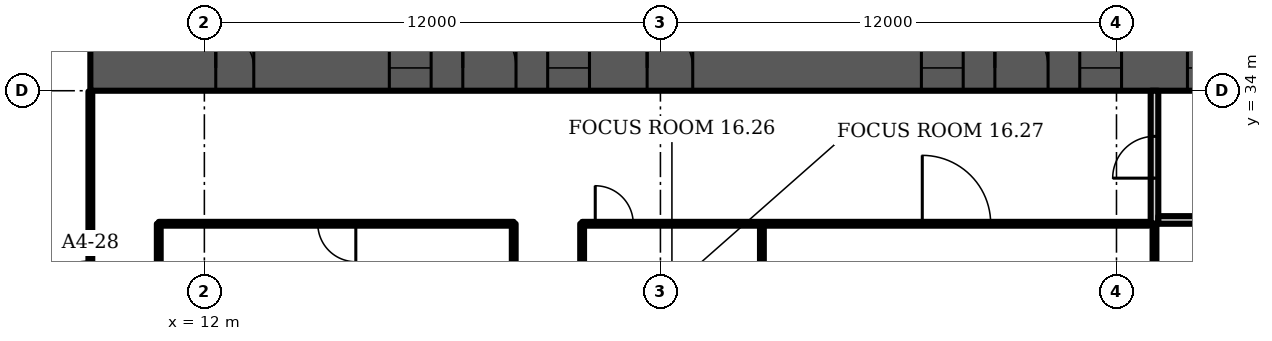
"""IFC4 building model, lengths in metres.
Left out: names, types, materials, properties, quantities, classifications, styles, units other than length and angle.
Written with IfcOpenShell. Run it as: python <this file> out.ifc"""

import sys

from ifc_helpers import new_model, si_unit, direction, frame, frame_2d, origin, place, context, subcontext, project, spatial, rectangle, extrude, element, fill, save


model = new_model("IFC4")
c1 = context("Model", 3, precision=1e-05, world=origin(), true_north=direction((0.0, 1.0)))
c2 = subcontext(c1, "Body", "Model", "MODEL_VIEW")
j1 = project(units=[si_unit("LENGTHUNIT", "METRE"), si_unit("PLANEANGLEUNIT", "RADIAN")], contexts=[c1])
p1 = place(None, origin())
s1 = spatial("IfcSite", under=j1, at=p1, CompositionType="ELEMENT")
p2 = place(p1, origin())
s2 = spatial("IfcBuilding", under=s1, at=p2, CompositionType="ELEMENT")
p3 = place(p2, frame((0.0, 0.0, 77.5)))
s3 = spatial("IfcBuildingStorey", under=s2, at=p3, CompositionType="ELEMENT", Elevation=77.5)
p4 = place(p3, frame((9.0, 34.6, 0.0), z_axis=(0.0, 0.0, 1.0), x_axis=(1.0, 0.0, 0.0)))
e1 = element("IfcWall", 1, at=p4, inside=s3, PredefinedType="SHEAR", context=c2, shape_type="SweptSolid", body=[
    extrude(rectangle(XDim=56.0, YDim=1.2, at=frame_2d((28.0, 0.0))), origin(), (0.0, 0.0, 1.0), 3.6),
])
p5 = place(p4, frame((3.3, 0.0, 0.0)))
e2 = element("IfcOpeningElement", 2, at=p5, cuts=e1, PredefinedType="OPENING", context=c2, shape_type="SweptSolid", body=[
    extrude(rectangle(XDim=1.0, YDim=2.1, at=frame_2d((0.5, 1.05))), frame((0.0, 0.61, 0.0), z_axis=(0.0, -1.0, 0.0), x_axis=(1.0, 0.0, 0.0)), (0.0, 0.0, 1.0), 1.22),
])
p6 = place(p4, frame((7.867, 0.0, 0.0)))
e3 = element("IfcOpeningElement", 3, at=p6, cuts=e1, PredefinedType="OPENING", context=c2, shape_type="SweptSolid", body=[
    extrude(rectangle(XDim=1.1, YDim=2.1, at=frame_2d((0.55, 1.05))), frame((0.0, 0.61, 0.0), z_axis=(0.0, -1.0, 0.0), x_axis=(1.0, 0.0, 0.0)), (0.0, 0.0, 1.0), 1.22),
])
p7 = place(p4, frame((12.033, 0.0, 0.0)))
e4 = element("IfcOpeningElement", 4, at=p7, cuts=e1, PredefinedType="OPENING", context=c2, shape_type="SweptSolid", body=[
    extrude(rectangle(XDim=1.1, YDim=2.1, at=frame_2d((0.55, 1.05))), frame((0.0, 0.61, 0.0), z_axis=(0.0, -1.0, 0.0), x_axis=(1.0, 0.0, 0.0)), (0.0, 0.0, 1.0), 1.22),
])
p8 = place(p4, frame((9.8, 0.0, 0.0)))
e5 = element("IfcOpeningElement", 5, at=p8, cuts=e1, PredefinedType="OPENING", context=c2, shape_type="SweptSolid", body=[
    extrude(rectangle(XDim=1.4, YDim=2.1, at=frame_2d((0.7, 1.05))), frame((0.0, 0.61, 0.0), z_axis=(0.0, -1.0, 0.0), x_axis=(1.0, 0.0, 0.0)), (0.0, 0.0, 1.0), 1.22),
])
p9 = place(p4, frame((14.65, 0.0, 0.0)))
e6 = element("IfcOpeningElement", 6, at=p9, cuts=e1, PredefinedType="OPENING", context=c2, shape_type="SweptSolid", body=[
    extrude(rectangle(XDim=1.2, YDim=2.1, at=frame_2d((0.6, 1.05))), frame((0.0, 0.61, 0.0), z_axis=(0.0, -1.0, 0.0), x_axis=(1.0, 0.0, 0.0)), (0.0, 0.0, 1.0), 1.22),
])
p10 = place(p4, frame((21.867, 0.0, 0.0)))
e7 = element("IfcOpeningElement", 7, at=p10, cuts=e1, PredefinedType="OPENING", context=c2, shape_type="SweptSolid", body=[
    extrude(rectangle(XDim=1.1, YDim=2.1, at=frame_2d((0.55, 1.05))), frame((0.0, 0.61, 0.0), z_axis=(0.0, -1.0, 0.0), x_axis=(1.0, 0.0, 0.0)), (0.0, 0.0, 1.0), 1.22),
])
p11 = place(p4, frame((26.033, 0.0, 0.0)))
e8 = element("IfcOpeningElement", 8, at=p11, cuts=e1, PredefinedType="OPENING", context=c2, shape_type="SweptSolid", body=[
    extrude(rectangle(XDim=1.1, YDim=2.1, at=frame_2d((0.55, 1.05))), frame((0.0, 0.61, 0.0), z_axis=(0.0, -1.0, 0.0), x_axis=(1.0, 0.0, 0.0)), (0.0, 0.0, 1.0), 1.22),
])
p12 = place(p4, frame((23.8, 0.0, 0.0)))
e9 = element("IfcOpeningElement", 9, at=p12, cuts=e1, PredefinedType="OPENING", context=c2, shape_type="SweptSolid", body=[
    extrude(rectangle(XDim=1.4, YDim=2.1, at=frame_2d((0.7, 1.05))), frame((0.0, 0.61, 0.0), z_axis=(0.0, -1.0, 0.0), x_axis=(1.0, 0.0, 0.0)), (0.0, 0.0, 1.0), 1.22),
])
p13 = place(p4, frame((28.867, 0.0, 0.0)))
e10 = element("IfcOpeningElement", 10, at=p13, cuts=e1, PredefinedType="OPENING", context=c2, shape_type="SweptSolid", body=[
    extrude(rectangle(XDim=1.1, YDim=2.1, at=frame_2d((0.55, 1.05))), frame((0.0, 0.61, 0.0), z_axis=(0.0, -1.0, 0.0), x_axis=(1.0, 0.0, 0.0)), (0.0, 0.0, 1.0), 1.22),
])
p14 = place(p4, frame((33.033, 0.0, 0.0)))
e11 = element("IfcOpeningElement", 11, at=p14, cuts=e1, PredefinedType="OPENING", context=c2, shape_type="SweptSolid", body=[
    extrude(rectangle(XDim=1.1, YDim=2.1, at=frame_2d((0.55, 1.05))), frame((0.0, 0.61, 0.0), z_axis=(0.0, -1.0, 0.0), x_axis=(1.0, 0.0, 0.0)), (0.0, 0.0, 1.0), 1.22),
])
p15 = place(p4, frame((40.15, 0.0, 0.0)))
e12 = element("IfcOpeningElement", 12, at=p15, cuts=e1, PredefinedType="OPENING", context=c2, shape_type="SweptSolid", body=[
    extrude(rectangle(XDim=1.2, YDim=2.1, at=frame_2d((0.6, 1.05))), frame((0.0, 0.61, 0.0), z_axis=(0.0, -1.0, 0.0), x_axis=(1.0, 0.0, 0.0)), (0.0, 0.0, 1.0), 1.22),
])
p16 = place(p4, frame((44.8, 0.0, 0.0)))
e13 = element("IfcOpeningElement", 13, at=p16, cuts=e1, PredefinedType="OPENING", context=c2, shape_type="SweptSolid", body=[
    extrude(rectangle(XDim=1.4, YDim=2.1, at=frame_2d((0.7, 1.05))), frame((0.0, 0.61, 0.0), z_axis=(0.0, -1.0, 0.0), x_axis=(1.0, 0.0, 0.0)), (0.0, 0.0, 1.0), 1.22),
])
p17 = place(p4, frame((49.867, 0.0, 0.0)))
e14 = element("IfcOpeningElement", 14, at=p17, cuts=e1, PredefinedType="OPENING", context=c2, shape_type="SweptSolid", body=[
    extrude(rectangle(XDim=1.1, YDim=2.1, at=frame_2d((0.55, 1.05))), frame((0.0, 0.61, 0.0), z_axis=(0.0, -1.0, 0.0), x_axis=(1.0, 0.0, 0.0)), (0.0, 0.0, 1.0), 1.22),
])
p18 = place(p4, frame((53.5, 0.0, 0.0)))
e15 = element("IfcOpeningElement", 15, at=p18, cuts=e1, PredefinedType="OPENING", context=c2, shape_type="SweptSolid", body=[
    extrude(rectangle(XDim=1.1, YDim=2.1, at=frame_2d((0.55, 1.05))), frame((0.0, 0.61, 0.0), z_axis=(0.0, -1.0, 0.0), x_axis=(1.0, 0.0, 0.0)), (0.0, 0.0, 1.0), 1.22),
])
p19 = place(p4, frame((51.567, 0.0, 0.0)))
e16 = element("IfcOpeningElement", 16, at=p19, cuts=e1, PredefinedType="OPENING", context=c2, shape_type="SweptSolid", body=[
    extrude(rectangle(XDim=1.4, YDim=2.1, at=frame_2d((0.7, 1.05))), frame((0.0, 0.61, 0.0), z_axis=(0.0, -1.0, 0.0), x_axis=(1.0, 0.0, 0.0)), (0.0, 0.0, 1.0), 1.22),
])
p20 = place(p3, frame((37.0, 30.5, 0.0), z_axis=(0.0, 0.0, 1.0), x_axis=(0.0, 1.0, 0.0)))
e17 = element("IfcWall", 17, at=p20, inside=s3, PredefinedType="PARTITIONING", context=c2, shape_type="SweptSolid", body=[
    extrude(rectangle(XDim=3.5, YDim=0.2, at=frame_2d((1.75, 0.0))), origin(), (0.0, 0.0, 1.0), 3.2),
])
p21 = place(p20, frame((1.2, 0.0, 0.0)))
e18 = element("IfcOpeningElement", 18, at=p21, cuts=e17, PredefinedType="OPENING", context=c2, shape_type="SweptSolid", body=[
    extrude(rectangle(XDim=1.1, YDim=2.1, at=frame_2d((0.55, 1.05))), frame((0.0, 0.11, 0.0), z_axis=(0.0, -1.0, 0.0), x_axis=(1.0, 0.0, 0.0)), (0.0, 0.0, 1.0), 0.22),
])
p22 = place(p3, frame((37.1, 30.6, 0.0), z_axis=(0.0, 0.0, 1.0), x_axis=(1.0, 0.0, 0.0)))
e19 = element("IfcWall", 19, at=p22, inside=s3, PredefinedType="PARTITIONING", context=c2, shape_type="SweptSolid", body=[
    extrude(rectangle(XDim=2.8, YDim=0.2, at=frame_2d((1.4, 0.0))), origin(), (0.0, 0.0, 1.0), 3.2),
])
p23 = place(p3, frame((9.0, 26.02, 0.0), z_axis=(0.0, 0.0, 1.0), x_axis=(0.0, 1.0, 0.0)))
e20 = element("IfcWall", 20, at=p23, inside=s3, PredefinedType="PARTITIONING", context=c2, shape_type="SweptSolid", body=[
    extrude(rectangle(XDim=7.96, YDim=0.1, at=frame_2d((3.98, 0.0))), origin(), (0.0, 0.0, 1.0), 3.2),
])
p24 = place(p23, frame((1.7, 0.0, 0.0)))
e21 = element("IfcOpeningElement", 21, at=p24, cuts=e20, PredefinedType="OPENING", context=c2, shape_type="SweptSolid", body=[
    extrude(rectangle(XDim=1.8, YDim=2.1, at=frame_2d((0.9, 1.05))), frame((0.0, 0.06, 0.0), z_axis=(0.0, -1.0, 0.0), x_axis=(1.0, 0.0, 0.0)), (0.0, 0.0, 1.0), 0.12),
])
p25 = place(p3, frame((10.8, 21.6, 0.0), z_axis=(0.0, 0.0, 1.0), x_axis=(0.0, 1.0, 0.0)))
e22 = element("IfcWall", 22, at=p25, inside=s3, PredefinedType="PARTITIONING", context=c2, shape_type="SweptSolid", body=[
    extrude(rectangle(XDim=8.9, YDim=0.1, at=frame_2d((4.45, 0.0))), origin(), (0.0, 0.0, 1.0), 3.2),
])
p26 = place(p3, frame((10.8, 30.5, 0.0), z_axis=(0.0, 0.0, 1.0), x_axis=(1.0, 0.0, 0.0)))
e23 = element("IfcWall", 23, at=p26, inside=s3, PredefinedType="PARTITIONING", context=c2, shape_type="SweptSolid", body=[
    extrude(rectangle(XDim=9.34, YDim=0.1, at=frame_2d((4.67, 0.0))), origin(), (0.0, 0.0, 1.0), 3.2),
])
p27 = place(p26, frame((4.185, 0.0, 0.0)))
e24 = element("IfcOpeningElement", 24, at=p27, cuts=e23, PredefinedType="OPENING", context=c2, shape_type="SweptSolid", body=[
    extrude(rectangle(XDim=1.0, YDim=2.1, at=frame_2d((0.5, 1.05))), frame((0.0, 0.06, 0.0), z_axis=(0.0, -1.0, 0.0), x_axis=(1.0, 0.0, 0.0)), (0.0, 0.0, 1.0), 0.12),
])
p28 = place(p3, frame((20.14, -1.13, 0.0), z_axis=(0.0, 0.0, 1.0), x_axis=(0.0, 1.0, 0.0)))
e25 = element("IfcWall", 25, at=p28, inside=s3, PredefinedType="PARTITIONING", context=c2, shape_type="SweptSolid", body=[
    extrude(rectangle(XDim=31.63, YDim=0.1, at=frame_2d((15.815, 0.0))), origin(), (0.0, 0.0, 1.0), 3.2),
])
p29 = place(p28, frame((1.825, 0.0, 0.0)))
e26 = element("IfcOpeningElement", 26, at=p29, cuts=e25, PredefinedType="OPENING", context=c2, shape_type="SweptSolid", body=[
    extrude(rectangle(XDim=1.0, YDim=2.1, at=frame_2d((0.5, 1.05))), frame((0.0, 0.06, 0.0), z_axis=(0.0, -1.0, 0.0), x_axis=(1.0, 0.0, 0.0)), (0.0, 0.0, 1.0), 0.12),
])
p30 = place(p28, frame((6.305, 0.0, 0.0)))
e27 = element("IfcOpeningElement", 27, at=p30, cuts=e25, PredefinedType="OPENING", context=c2, shape_type="SweptSolid", body=[
    extrude(rectangle(XDim=1.0, YDim=2.1, at=frame_2d((0.5, 1.05))), frame((0.0, 0.06, 0.0), z_axis=(0.0, -1.0, 0.0), x_axis=(1.0, 0.0, 0.0)), (0.0, 0.0, 1.0), 0.12),
])
p31 = place(p28, frame((11.35, 0.0, 0.0)))
e28 = element("IfcOpeningElement", 28, at=p31, cuts=e25, PredefinedType="OPENING", context=c2, shape_type="SweptSolid", body=[
    extrude(rectangle(XDim=1.0, YDim=2.1, at=frame_2d((0.5, 1.05))), frame((0.0, 0.06, 0.0), z_axis=(0.0, -1.0, 0.0), x_axis=(1.0, 0.0, 0.0)), (0.0, 0.0, 1.0), 0.12),
])
p32 = place(p28, frame((15.985, 0.0, 0.0)))
e29 = element("IfcOpeningElement", 29, at=p32, cuts=e25, PredefinedType="OPENING", context=c2, shape_type="SweptSolid", body=[
    extrude(rectangle(XDim=1.0, YDim=2.1, at=frame_2d((0.5, 1.05))), frame((0.0, 0.06, 0.0), z_axis=(0.0, -1.0, 0.0), x_axis=(1.0, 0.0, 0.0)), (0.0, 0.0, 1.0), 0.12),
])
p33 = place(p28, frame((20.38, 0.0, 0.0)))
e30 = element("IfcOpeningElement", 30, at=p33, cuts=e25, PredefinedType="OPENING", context=c2, shape_type="SweptSolid", body=[
    extrude(rectangle(XDim=1.0, YDim=2.1, at=frame_2d((0.5, 1.05))), frame((0.0, 0.06, 0.0), z_axis=(0.0, -1.0, 0.0), x_axis=(1.0, 0.0, 0.0)), (0.0, 0.0, 1.0), 0.12),
])
p34 = place(p28, frame((24.695, 0.0, 0.0)))
e31 = element("IfcOpeningElement", 31, at=p34, cuts=e25, PredefinedType="OPENING", context=c2, shape_type="SweptSolid", body=[
    extrude(rectangle(XDim=1.0, YDim=2.1, at=frame_2d((0.5, 1.05))), frame((0.0, 0.06, 0.0), z_axis=(0.0, -1.0, 0.0), x_axis=(1.0, 0.0, 0.0)), (0.0, 0.0, 1.0), 0.12),
])
p35 = place(p3, frame((21.94, -1.29, 0.0), z_axis=(0.0, 0.0, 1.0), x_axis=(0.0, 1.0, 0.0)))
e32 = element("IfcWall", 32, at=p35, inside=s3, PredefinedType="PARTITIONING", context=c2, shape_type="SweptSolid", body=[
    extrude(rectangle(XDim=31.79, YDim=0.1, at=frame_2d((15.895, 0.0))), origin(), (0.0, 0.0, 1.0), 3.2),
])
p36 = place(p35, frame((1.82, 0.0, 0.0)))
e33 = element("IfcOpeningElement", 33, at=p36, cuts=e32, PredefinedType="OPENING", context=c2, shape_type="SweptSolid", body=[
    extrude(rectangle(XDim=1.0, YDim=2.1, at=frame_2d((0.5, 1.05))), frame((0.0, 0.06, 0.0), z_axis=(0.0, -1.0, 0.0), x_axis=(1.0, 0.0, 0.0)), (0.0, 0.0, 1.0), 0.12),
])
p37 = place(p35, frame((6.63, 0.0, 0.0)))
e34 = element("IfcOpeningElement", 34, at=p37, cuts=e32, PredefinedType="OPENING", context=c2, shape_type="SweptSolid", body=[
    extrude(rectangle(XDim=1.0, YDim=2.1, at=frame_2d((0.5, 1.05))), frame((0.0, 0.06, 0.0), z_axis=(0.0, -1.0, 0.0), x_axis=(1.0, 0.0, 0.0)), (0.0, 0.0, 1.0), 0.12),
])
p38 = place(p35, frame((11.59, 0.0, 0.0)))
e35 = element("IfcOpeningElement", 35, at=p38, cuts=e32, PredefinedType="OPENING", context=c2, shape_type="SweptSolid", body=[
    extrude(rectangle(XDim=1.0, YDim=2.1, at=frame_2d((0.5, 1.05))), frame((0.0, 0.06, 0.0), z_axis=(0.0, -1.0, 0.0), x_axis=(1.0, 0.0, 0.0)), (0.0, 0.0, 1.0), 0.12),
])
p39 = place(p35, frame((15.55, 0.0, 0.0)))
e36 = element("IfcOpeningElement", 36, at=p39, cuts=e32, PredefinedType="OPENING", context=c2, shape_type="SweptSolid", body=[
    extrude(rectangle(XDim=1.0, YDim=2.1, at=frame_2d((0.5, 1.05))), frame((0.0, 0.06, 0.0), z_axis=(0.0, -1.0, 0.0), x_axis=(1.0, 0.0, 0.0)), (0.0, 0.0, 1.0), 0.12),
])
p40 = place(p35, frame((18.425, 0.0, 0.0)))
e37 = element("IfcOpeningElement", 37, at=p40, cuts=e32, PredefinedType="OPENING", context=c2, shape_type="SweptSolid", body=[
    extrude(rectangle(XDim=1.0, YDim=2.1, at=frame_2d((0.5, 1.05))), frame((0.0, 0.06, 0.0), z_axis=(0.0, -1.0, 0.0), x_axis=(1.0, 0.0, 0.0)), (0.0, 0.0, 1.0), 0.12),
])
p41 = place(p35, frame((21.305, 0.0, 0.0)))
e38 = element("IfcOpeningElement", 38, at=p41, cuts=e32, PredefinedType="OPENING", context=c2, shape_type="SweptSolid", body=[
    extrude(rectangle(XDim=1.0, YDim=2.1, at=frame_2d((0.5, 1.05))), frame((0.0, 0.06, 0.0), z_axis=(0.0, -1.0, 0.0), x_axis=(1.0, 0.0, 0.0)), (0.0, 0.0, 1.0), 0.12),
])
p42 = place(p35, frame((24.18, 0.0, 0.0)))
e39 = element("IfcOpeningElement", 39, at=p42, cuts=e32, PredefinedType="OPENING", context=c2, shape_type="SweptSolid", body=[
    extrude(rectangle(XDim=1.0, YDim=2.1, at=frame_2d((0.5, 1.05))), frame((0.0, 0.06, 0.0), z_axis=(0.0, -1.0, 0.0), x_axis=(1.0, 0.0, 0.0)), (0.0, 0.0, 1.0), 0.12),
])
p43 = place(p35, frame((27.055, 0.0, 0.0)))
e40 = element("IfcOpeningElement", 40, at=p43, cuts=e32, PredefinedType="OPENING", context=c2, shape_type="SweptSolid", body=[
    extrude(rectangle(XDim=1.0, YDim=2.1, at=frame_2d((0.5, 1.05))), frame((0.0, 0.06, 0.0), z_axis=(0.0, -1.0, 0.0), x_axis=(1.0, 0.0, 0.0)), (0.0, 0.0, 1.0), 0.12),
])
p44 = place(p3, frame((21.94, 30.5, 0.0), z_axis=(0.0, 0.0, 1.0), x_axis=(1.0, 0.0, 0.0)))
e41 = element("IfcWall", 41, at=p44, inside=s3, PredefinedType="PARTITIONING", context=c2, shape_type="SweptSolid", body=[
    extrude(rectangle(XDim=14.91, YDim=0.1, at=frame_2d((7.455, 0.0))), origin(), (0.0, 0.0, 1.0), 3.2),
])
p45 = place(p44, frame((0.345, 0.0, 0.0)))
e42 = element("IfcOpeningElement", 42, at=p45, cuts=e41, PredefinedType="OPENING", context=c2, shape_type="SweptSolid", body=[
    extrude(rectangle(XDim=1.0, YDim=2.1, at=frame_2d((0.5, 1.05))), frame((0.0, 0.06, 0.0), z_axis=(0.0, -1.0, 0.0), x_axis=(1.0, 0.0, 0.0)), (0.0, 0.0, 1.0), 0.12),
])
p46 = place(p44, frame((8.95, 0.0, 0.0)))
e43 = element("IfcOpeningElement", 43, at=p46, cuts=e41, PredefinedType="OPENING", context=c2, shape_type="SweptSolid", body=[
    extrude(rectangle(XDim=1.8, YDim=2.1, at=frame_2d((0.9, 1.05))), frame((0.0, 0.06, 0.0), z_axis=(0.0, -1.0, 0.0), x_axis=(1.0, 0.0, 0.0)), (0.0, 0.0, 1.0), 0.12),
])
p47 = place(p3, frame((26.67, 16.115, 0.0), z_axis=(0.0, 0.0, 1.0), x_axis=(0.0, 1.0, 0.0)))
e44 = element("IfcWall", 44, at=p47, inside=s3, PredefinedType="PARTITIONING", context=c2, shape_type="SweptSolid", body=[
    extrude(rectangle(XDim=14.385, YDim=0.1, at=frame_2d((7.192, 0.0))), origin(), (0.0, 0.0, 1.0), 3.2),
])
p48 = place(p3, frame((37.0, 13.24, 0.0), z_axis=(0.0, 0.0, 1.0), x_axis=(0.0, 1.0, 0.0)))
e45 = element("IfcWall", 45, at=p48, inside=s3, PredefinedType="PARTITIONING", context=c2, shape_type="SweptSolid", body=[
    extrude(rectangle(XDim=17.26, YDim=0.1, at=frame_2d((8.63, 0.0))), origin(), (0.0, 0.0, 1.0), 3.2),
])
p49 = place(p5, origin())
e46 = element("IfcDoor", 46, at=p49, inside=s3, OperationType="SINGLE_SWING_LEFT", PredefinedType="DOOR", context=c2, shape_type="SweptSolid", body=[
    extrude(rectangle(XDim=1.0, YDim=2.1, at=frame_2d((0.5, 1.05))), frame((0.0, 0.6, 0.0), z_axis=(0.0, -1.0, 0.0), x_axis=(1.0, 0.0, 0.0)), (0.0, 0.0, 1.0), 1.199),
])
fill(e2, e46)
p50 = place(p6, origin())
e47 = element("IfcDoor", 47, at=p50, inside=s3, OperationType="DOUBLE_DOOR_SLIDING", PredefinedType="DOOR", context=c2, shape_type="SweptSolid", body=[
    extrude(rectangle(XDim=1.1, YDim=2.1, at=frame_2d((0.55, 1.05))), frame((0.0, 0.025, 0.0), z_axis=(0.0, -1.0, 0.0), x_axis=(1.0, 0.0, 0.0)), (0.0, 0.0, 1.0), 0.05),
])
fill(e3, e47)
p51 = place(p7, origin())
e48 = element("IfcDoor", 48, at=p51, inside=s3, OperationType="DOUBLE_DOOR_SLIDING", PredefinedType="DOOR", context=c2, shape_type="SweptSolid", body=[
    extrude(rectangle(XDim=1.1, YDim=2.1, at=frame_2d((0.55, 1.05))), frame((0.0, 0.025, 0.0), z_axis=(0.0, -1.0, 0.0), x_axis=(1.0, 0.0, 0.0)), (0.0, 0.0, 1.0), 0.05),
])
fill(e4, e48)
p52 = place(p8, origin())
e49 = element("IfcDoor", 49, at=p52, inside=s3, OperationType="DOUBLE_DOOR_SINGLE_SWING", PredefinedType="DOOR", context=c2, shape_type="SweptSolid", body=[
    extrude(rectangle(XDim=1.4, YDim=2.1, at=frame_2d((0.7, 1.05))), frame((0.0, 0.025, 0.0), z_axis=(0.0, -1.0, 0.0), x_axis=(1.0, 0.0, 0.0)), (0.0, 0.0, 1.0), 0.05),
])
fill(e5, e49)
p53 = place(p9, origin())
e50 = element("IfcDoor", 50, at=p53, inside=s3, OperationType="SINGLE_SWING_LEFT", PredefinedType="DOOR", context=c2, shape_type="SweptSolid", body=[
    extrude(rectangle(XDim=1.2, YDim=2.1, at=frame_2d((0.6, 1.05))), frame((0.0, 0.025, 0.0), z_axis=(0.0, -1.0, 0.0), x_axis=(1.0, 0.0, 0.0)), (0.0, 0.0, 1.0), 0.05),
])
fill(e6, e50)
p54 = place(p10, origin())
e51 = element("IfcDoor", 51, at=p54, inside=s3, OperationType="DOUBLE_DOOR_SLIDING", PredefinedType="DOOR", context=c2, shape_type="SweptSolid", body=[
    extrude(rectangle(XDim=1.1, YDim=2.1, at=frame_2d((0.55, 1.05))), frame((0.0, 0.025, 0.0), z_axis=(0.0, -1.0, 0.0), x_axis=(1.0, 0.0, 0.0)), (0.0, 0.0, 1.0), 0.05),
])
fill(e7, e51)
p55 = place(p11, origin())
e52 = element("IfcDoor", 52, at=p55, inside=s3, OperationType="DOUBLE_DOOR_SLIDING", PredefinedType="DOOR", context=c2, shape_type="SweptSolid", body=[
    extrude(rectangle(XDim=1.1, YDim=2.1, at=frame_2d((0.55, 1.05))), frame((0.0, 0.025, 0.0), z_axis=(0.0, -1.0, 0.0), x_axis=(1.0, 0.0, 0.0)), (0.0, 0.0, 1.0), 0.05),
])
fill(e8, e52)
p56 = place(p12, origin())
e53 = element("IfcDoor", 53, at=p56, inside=s3, OperationType="DOUBLE_DOOR_SINGLE_SWING", PredefinedType="DOOR", context=c2, shape_type="SweptSolid", body=[
    extrude(rectangle(XDim=1.4, YDim=2.1, at=frame_2d((0.7, 1.05))), frame((0.0, 0.025, 0.0), z_axis=(0.0, -1.0, 0.0), x_axis=(1.0, 0.0, 0.0)), (0.0, 0.0, 1.0), 0.05),
])
fill(e9, e53)
p57 = place(p13, origin())
e54 = element("IfcDoor", 54, at=p57, inside=s3, OperationType="DOUBLE_DOOR_SLIDING", PredefinedType="DOOR", context=c2, shape_type="SweptSolid", body=[
    extrude(rectangle(XDim=1.1, YDim=2.1, at=frame_2d((0.55, 1.05))), frame((0.0, 0.025, 0.0), z_axis=(0.0, -1.0, 0.0), x_axis=(1.0, 0.0, 0.0)), (0.0, 0.0, 1.0), 0.05),
])
fill(e10, e54)
p58 = place(p21, origin())
e55 = element("IfcDoor", 55, at=p58, inside=s3, OperationType="SINGLE_SWING_LEFT", PredefinedType="DOOR", context=c2, shape_type="SweptSolid", body=[
    extrude(rectangle(XDim=1.1, YDim=2.1, at=frame_2d((0.55, 1.05))), frame((0.0, 0.025, 0.0), z_axis=(0.0, -1.0, 0.0), x_axis=(1.0, 0.0, 0.0)), (0.0, 0.0, 1.0), 0.05),
])
fill(e18, e55)
p59 = place(p24, origin())
e56 = element("IfcDoor", 56, at=p59, inside=s3, OperationType="DOUBLE_DOOR_SINGLE_SWING", PredefinedType="DOOR", context=c2, shape_type="SweptSolid", body=[
    extrude(rectangle(XDim=1.8, YDim=2.1, at=frame_2d((0.9, 1.05))), frame((0.0, 0.025, 0.0), z_axis=(0.0, -1.0, 0.0), x_axis=(1.0, 0.0, 0.0)), (0.0, 0.0, 1.0), 0.05),
])
fill(e21, e56)
p60 = place(p27, origin())
e57 = element("IfcDoor", 57, at=p60, inside=s3, OperationType="SINGLE_SWING_RIGHT", PredefinedType="DOOR", context=c2, shape_type="SweptSolid", body=[
    extrude(rectangle(XDim=1.0, YDim=2.1, at=frame_2d((0.5, 1.05))), frame((0.0, 0.025, 0.0), z_axis=(0.0, -1.0, 0.0), x_axis=(1.0, 0.0, 0.0)), (0.0, 0.0, 1.0), 0.05),
])
fill(e24, e57)
p61 = place(p45, origin())
e58 = element("IfcDoor", 58, at=p61, inside=s3, OperationType="SINGLE_SWING_LEFT", PredefinedType="DOOR", context=c2, shape_type="SweptSolid", body=[
    extrude(rectangle(XDim=1.0, YDim=2.1, at=frame_2d((0.5, 1.05))), frame((0.0, 0.025, 0.0), z_axis=(0.0, -1.0, 0.0), x_axis=(1.0, 0.0, 0.0)), (0.0, 0.0, 1.0), 0.05),
])
fill(e42, e58)
p62 = place(p46, origin())
e59 = element("IfcDoor", 59, at=p62, inside=s3, OperationType="DOUBLE_DOOR_SINGLE_SWING", PredefinedType="DOOR", context=c2, shape_type="SweptSolid", body=[
    extrude(rectangle(XDim=1.8, YDim=2.1, at=frame_2d((0.9, 1.05))), frame((0.0, 0.025, 0.0), z_axis=(0.0, -1.0, 0.0), x_axis=(1.0, 0.0, 0.0)), (0.0, 0.0, 1.0), 0.05),
])
fill(e43, e59)
save(model, sys.argv[1])
